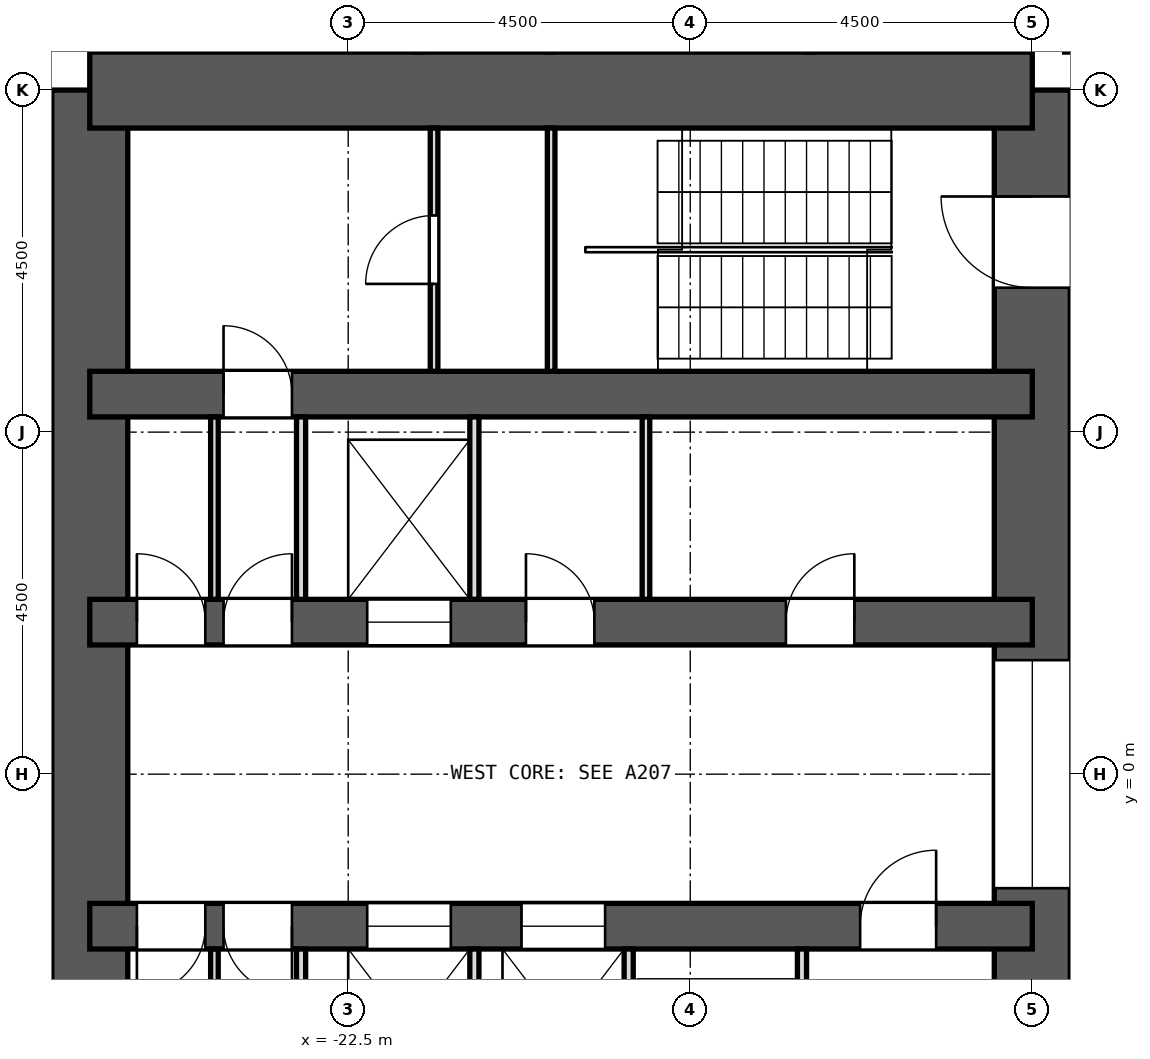
"""IFC4 building model, lengths in metres.
Left out: names, types, materials, properties, quantities, classifications, styles, units other than length and angle.
Written with IfcOpenShell. Run it as: python <this file> out.ifc"""

import sys

from ifc_helpers import new_model, si_unit, direction, frame, frame_2d, origin, place, context, subcontext, project, spatial, rectangle, extrude, element, fill, save


model = new_model("IFC4")
c1 = context("Model", 3, precision=1e-05, world=origin(), true_north=direction((0.0, 1.0)))
c2 = subcontext(c1, "Body", "Model", "MODEL_VIEW")
j1 = project(units=[si_unit("LENGTHUNIT", "METRE"), si_unit("PLANEANGLEUNIT", "RADIAN")], contexts=[c1])
p1 = place(None, origin())
s1 = spatial("IfcSite", under=j1, at=p1, CompositionType="ELEMENT")
p2 = place(p1, origin())
s2 = spatial("IfcBuilding", under=s1, at=p2, CompositionType="ELEMENT")
p3 = place(p2, frame((0.0, 0.0, 17.6)))
s3 = spatial("IfcBuildingStorey", under=s2, at=p3, CompositionType="ELEMENT", Elevation=17.6)
p4 = place(p3, frame((-13.5, -9.0, 0.0), z_axis=(0.0, 0.0, 1.0), x_axis=(0.0, 1.0, 0.0)))
e1 = element("IfcWall", 1, at=p4, inside=s3, PredefinedType="SHEAR", context=c2, shape_type="SweptSolid", body=[
    extrude(rectangle(XDim=18.0, YDim=1.0, at=frame_2d((9.0, 0.0))), origin(), (0.0, 0.0, 1.0), 4.2),
])
p5 = place(p4, frame((15.4, 0.0, 0.0)))
e2 = element("IfcOpeningElement", 2, at=p5, cuts=e1, PredefinedType="OPENING", context=c2, shape_type="SweptSolid", body=[
    extrude(rectangle(XDim=1.2, YDim=2.1, at=frame_2d((0.6, 1.05))), frame((0.0, 0.512, 0.0), z_axis=(0.0, -1.0, 0.0), x_axis=(1.0, 0.0, 0.0)), (0.0, 0.0, 1.0), 1.024),
])
p6 = place(p4, frame((1.4, 0.0, 0.0)))
e3 = element("IfcOpeningElement", 3, at=p6, cuts=e1, PredefinedType="OPENING", context=c2, shape_type="SweptSolid", body=[
    extrude(rectangle(XDim=1.2, YDim=2.1, at=frame_2d((0.6, 1.05))), frame((0.0, 0.512, 0.0), z_axis=(0.0, -1.0, 0.0), x_axis=(1.0, 0.0, 0.0)), (0.0, 0.0, 1.0), 1.024),
])
p7 = place(p4, frame((7.5, 0.0, 0.0)))
e4 = element("IfcOpeningElement", 4, at=p7, cuts=e1, PredefinedType="OPENING", context=c2, shape_type="SweptSolid", body=[
    extrude(rectangle(XDim=3.0, YDim=2.4, at=frame_2d((1.5, 1.2))), frame((0.0, 0.512, 0.0), z_axis=(0.0, -1.0, 0.0), x_axis=(1.0, 0.0, 0.0)), (0.0, 0.0, 1.0), 1.024),
])
p8 = place(p3, frame((-25.9, -9.0, 0.0), z_axis=(0.0, 0.0, 1.0), x_axis=(0.0, 1.0, 0.0)))
e5 = element("IfcWall", 5, at=p8, inside=s3, PredefinedType="SHEAR", context=c2, shape_type="SweptSolid", body=[
    extrude(rectangle(XDim=18.0, YDim=1.0, at=frame_2d((9.0, 0.0))), origin(), (0.0, 0.0, 1.0), 4.2),
])
p9 = place(p3, frame((-13.5, 9.0, 0.0), z_axis=(0.0, 0.0, 1.0), x_axis=(-1.0, 0.0, 0.0)))
e6 = element("IfcWall", 6, at=p9, inside=s3, PredefinedType="SHEAR", context=c2, shape_type="SweptSolid", body=[
    extrude(rectangle(XDim=12.4, YDim=1.0, at=frame_2d((6.2, 0.0))), origin(), (0.0, 0.0, 1.0), 4.2),
])
p10 = place(p3, frame((-13.5, 5.0, 0.0), z_axis=(0.0, 0.0, 1.0), x_axis=(-1.0, 0.0, 0.0)))
e7 = element("IfcWall", 7, at=p10, inside=s3, PredefinedType="SHEAR", context=c2, shape_type="SweptSolid", body=[
    extrude(rectangle(XDim=12.4, YDim=0.6, at=frame_2d((6.2, 0.0))), origin(), (0.0, 0.0, 1.0), 4.2),
])
p11 = place(p10, frame((9.74, 0.0, 0.0)))
e8 = element("IfcOpeningElement", 8, at=p11, cuts=e7, PredefinedType="OPENING", context=c2, shape_type="SweptSolid", body=[
    extrude(rectangle(XDim=0.9, YDim=2.1, at=frame_2d((0.45, 1.05))), frame((0.0, 0.312, 0.0), z_axis=(0.0, -1.0, 0.0), x_axis=(1.0, 0.0, 0.0)), (0.0, 0.0, 1.0), 0.624),
])
p12 = place(p3, frame((-13.5, 2.0, 0.0), z_axis=(0.0, 0.0, 1.0), x_axis=(-1.0, 0.0, 0.0)))
e9 = element("IfcWall", 9, at=p12, inside=s3, PredefinedType="SHEAR", context=c2, shape_type="SweptSolid", body=[
    extrude(rectangle(XDim=12.4, YDim=0.6, at=frame_2d((6.2, 0.0))), origin(), (0.0, 0.0, 1.0), 4.2),
])
p13 = place(p12, frame((7.65, 0.0, 0.0)))
e10 = element("IfcOpeningElement", 10, at=p13, cuts=e9, PredefinedType="OPENING", context=c2, shape_type="SweptSolid", body=[
    extrude(rectangle(XDim=1.1, YDim=2.1, at=frame_2d((0.55, 1.05))), frame((0.0, 0.312, 0.0), z_axis=(0.0, -1.0, 0.0), x_axis=(1.0, 0.0, 0.0)), (0.0, 0.0, 1.0), 0.624),
])
p14 = place(p12, frame((2.341, 0.0, 0.0)))
e11 = element("IfcOpeningElement", 11, at=p14, cuts=e9, PredefinedType="OPENING", context=c2, shape_type="SweptSolid", body=[
    extrude(rectangle(XDim=0.9, YDim=2.1, at=frame_2d((0.45, 1.05))), frame((0.0, 0.312, 0.0), z_axis=(0.0, -1.0, 0.0), x_axis=(1.0, 0.0, 0.0)), (0.0, 0.0, 1.0), 0.624),
])
p15 = place(p12, frame((5.761, 0.0, 0.0)))
e12 = element("IfcOpeningElement", 12, at=p15, cuts=e9, PredefinedType="OPENING", context=c2, shape_type="SweptSolid", body=[
    extrude(rectangle(XDim=0.9, YDim=2.1, at=frame_2d((0.45, 1.05))), frame((0.0, 0.312, 0.0), z_axis=(0.0, -1.0, 0.0), x_axis=(1.0, 0.0, 0.0)), (0.0, 0.0, 1.0), 0.624),
])
p16 = place(p12, frame((9.74, 0.0, 0.0)))
e13 = element("IfcOpeningElement", 13, at=p16, cuts=e9, PredefinedType="OPENING", context=c2, shape_type="SweptSolid", body=[
    extrude(rectangle(XDim=0.9, YDim=2.1, at=frame_2d((0.45, 1.05))), frame((0.0, 0.312, 0.0), z_axis=(0.0, -1.0, 0.0), x_axis=(1.0, 0.0, 0.0)), (0.0, 0.0, 1.0), 0.624),
])
p17 = place(p12, frame((10.88, 0.0, 0.0)))
e14 = element("IfcOpeningElement", 14, at=p17, cuts=e9, PredefinedType="OPENING", context=c2, shape_type="SweptSolid", body=[
    extrude(rectangle(XDim=0.9, YDim=2.1, at=frame_2d((0.45, 1.05))), frame((0.0, 0.312, 0.0), z_axis=(0.0, -1.0, 0.0), x_axis=(1.0, 0.0, 0.0)), (0.0, 0.0, 1.0), 0.624),
])
p18 = place(p3, frame((-13.5, -2.0, 0.0), z_axis=(0.0, 0.0, 1.0), x_axis=(-1.0, 0.0, 0.0)))
e15 = element("IfcWall", 15, at=p18, inside=s3, PredefinedType="SHEAR", context=c2, shape_type="SweptSolid", body=[
    extrude(rectangle(XDim=12.4, YDim=0.6, at=frame_2d((6.2, 0.0))), origin(), (0.0, 0.0, 1.0), 4.2),
])
p19 = place(p18, frame((5.62, 0.0, 0.0)))
e16 = element("IfcOpeningElement", 16, at=p19, cuts=e15, PredefinedType="OPENING", context=c2, shape_type="SweptSolid", body=[
    extrude(rectangle(XDim=1.1, YDim=2.1, at=frame_2d((0.55, 1.05))), frame((0.0, 0.312, 0.0), z_axis=(0.0, -1.0, 0.0), x_axis=(1.0, 0.0, 0.0)), (0.0, 0.0, 1.0), 0.624),
])
p20 = place(p18, frame((7.65, 0.0, 0.0)))
e17 = element("IfcOpeningElement", 17, at=p20, cuts=e15, PredefinedType="OPENING", context=c2, shape_type="SweptSolid", body=[
    extrude(rectangle(XDim=1.1, YDim=2.1, at=frame_2d((0.55, 1.05))), frame((0.0, 0.312, 0.0), z_axis=(0.0, -1.0, 0.0), x_axis=(1.0, 0.0, 0.0)), (0.0, 0.0, 1.0), 0.624),
])
p21 = place(p18, frame((1.265, 0.0, 0.0)))
e18 = element("IfcOpeningElement", 18, at=p21, cuts=e15, PredefinedType="OPENING", context=c2, shape_type="SweptSolid", body=[
    extrude(rectangle(XDim=1.0, YDim=2.1, at=frame_2d((0.5, 1.05))), frame((0.0, 0.312, 0.0), z_axis=(0.0, -1.0, 0.0), x_axis=(1.0, 0.0, 0.0)), (0.0, 0.0, 1.0), 0.624),
])
p22 = place(p18, frame((9.74, 0.0, 0.0)))
e19 = element("IfcOpeningElement", 19, at=p22, cuts=e15, PredefinedType="OPENING", context=c2, shape_type="SweptSolid", body=[
    extrude(rectangle(XDim=0.9, YDim=2.1, at=frame_2d((0.45, 1.05))), frame((0.0, 0.312, 0.0), z_axis=(0.0, -1.0, 0.0), x_axis=(1.0, 0.0, 0.0)), (0.0, 0.0, 1.0), 0.624),
])
p23 = place(p18, frame((10.88, 0.0, 0.0)))
e20 = element("IfcOpeningElement", 20, at=p23, cuts=e15, PredefinedType="OPENING", context=c2, shape_type="SweptSolid", body=[
    extrude(rectangle(XDim=0.9, YDim=2.1, at=frame_2d((0.45, 1.05))), frame((0.0, 0.312, 0.0), z_axis=(0.0, -1.0, 0.0), x_axis=(1.0, 0.0, 0.0)), (0.0, 0.0, 1.0), 0.624),
])
p24 = place(p3, frame((-26.328, 11.255, 0.0), z_axis=(0.0, 0.0, 1.0), x_axis=(-0.342034744565, -0.939687306241, 0.0)))
e21 = element("IfcWall", 21, at=p24, inside=s3, PredefinedType="SOLIDWALL", context=c2, shape_type="SweptSolid", body=[
    extrude(rectangle(XDim=4.099, YDim=0.6, at=frame_2d((2.05, 0.0))), origin(), (0.0, 0.0, 1.0), 3.6),
])
p25 = place(p3, frame((-18.583, 2.3, 0.0), z_axis=(0.0, 0.0, 1.0), x_axis=(0.0, 1.0, 0.0)))
e22 = element("IfcWall", 22, at=p25, inside=s3, PredefinedType="PARTITIONING", context=c2, shape_type="SweptSolid", body=[
    extrude(rectangle(XDim=2.4, YDim=0.1, at=frame_2d((1.2, 0.0))), origin(), (0.0, 0.0, 1.0), 3.6),
])
for number, where, z_axis, x_axis in (
    (23, (-20.84, 2.3, 0.0), (0.0, 0.0, 1.0), (0.0, 1.0, 0.0)),
    (24, (-23.12, 2.3, 0.0), (0.0, 0.0, 1.0), (0.0, 1.0, 0.0)),
):
    element("IfcWall", number, at=place(p3, frame(where, z_axis=z_axis, x_axis=x_axis)), inside=s3, PredefinedType="PARTITIONING", context=c2, shape_type="SweptSolid", body=[
        extrude(rectangle(XDim=2.4, YDim=0.12, at=frame_2d((1.2, 0.0))), origin(), (0.0, 0.0, 1.0), 3.6),
    ])
p26 = place(p3, frame((-24.26, 2.3, 0.0), z_axis=(0.0, 0.0, 1.0), x_axis=(0.0, 1.0, 0.0)))
e25 = element("IfcWall", 25, at=p26, inside=s3, PredefinedType="PARTITIONING", context=c2, shape_type="SweptSolid", body=[
    extrude(rectangle(XDim=2.4, YDim=0.1, at=frame_2d((1.2, 0.0))), origin(), (0.0, 0.0, 1.0), 3.6),
])
p27 = place(p3, frame((-16.53, -4.7, 0.0), z_axis=(0.0, 0.0, 1.0), x_axis=(0.0, 1.0, 0.0)))
e26 = element("IfcWall", 26, at=p27, inside=s3, PredefinedType="PARTITIONING", context=c2, shape_type="SweptSolid", body=[
    extrude(rectangle(XDim=2.4, YDim=0.12, at=frame_2d((1.2, 0.0))), origin(), (0.0, 0.0, 1.0), 3.6),
])
p28 = place(p27, frame((0.65, 0.0, 0.0)))
e27 = element("IfcOpeningElement", 27, at=p28, cuts=e26, PredefinedType="OPENING", context=c2, shape_type="SweptSolid", body=[
    extrude(rectangle(XDim=1.1, YDim=2.1, at=frame_2d((0.55, 1.05))), frame((0.0, 0.072, 0.0), z_axis=(0.0, -1.0, 0.0), x_axis=(1.0, 0.0, 0.0)), (0.0, 0.0, 1.0), 0.144),
])
for number, where, z_axis, x_axis in (
    (28, (-18.81, -4.7, 0.0), (0.0, 0.0, 1.0), (0.0, 1.0, 0.0)),
    (29, (-20.84, -4.7, 0.0), (0.0, 0.0, 1.0), (0.0, 1.0, 0.0)),
    (30, (-23.12, -4.7, 0.0), (0.0, 0.0, 1.0), (0.0, 1.0, 0.0)),
):
    element("IfcWall", number, at=place(p3, frame(where, z_axis=z_axis, x_axis=x_axis)), inside=s3, PredefinedType="PARTITIONING", context=c2, shape_type="SweptSolid", body=[
        extrude(rectangle(XDim=2.4, YDim=0.12, at=frame_2d((1.2, 0.0))), origin(), (0.0, 0.0, 1.0), 3.6),
    ])
p29 = place(p3, frame((-24.26, -4.7, 0.0), z_axis=(0.0, 0.0, 1.0), x_axis=(0.0, 1.0, 0.0)))
e31 = element("IfcWall", 31, at=p29, inside=s3, PredefinedType="PARTITIONING", context=c2, shape_type="SweptSolid", body=[
    extrude(rectangle(XDim=2.4, YDim=0.1, at=frame_2d((1.2, 0.0))), origin(), (0.0, 0.0, 1.0), 3.6),
])
p30 = place(p3, frame((-19.83, 5.3, 0.0), z_axis=(0.0, 0.0, 1.0), x_axis=(0.0, 1.0, 0.0)))
e32 = element("IfcWall", 32, at=p30, inside=s3, PredefinedType="PARTITIONING", context=c2, shape_type="SweptSolid", body=[
    extrude(rectangle(XDim=3.2, YDim=0.1, at=frame_2d((1.6, 0.0))), origin(), (0.0, 0.0, 1.0), 3.6),
])
p31 = place(p3, frame((-21.37, 5.3, 0.0), z_axis=(0.0, 0.0, 1.0), x_axis=(0.0, 1.0, 0.0)))
e33 = element("IfcWall", 33, at=p31, inside=s3, PredefinedType="PARTITIONING", context=c2, shape_type="SweptSolid", body=[
    extrude(rectangle(XDim=3.2, YDim=0.1, at=frame_2d((1.6, 0.0))), origin(), (0.0, 0.0, 1.0), 3.6),
])
p32 = place(p31, frame((1.15, 0.0, 0.0)))
e34 = element("IfcOpeningElement", 34, at=p32, cuts=e33, PredefinedType="OPENING", context=c2, shape_type="SweptSolid", body=[
    extrude(rectangle(XDim=0.9, YDim=2.1, at=frame_2d((0.45, 1.05))), frame((0.0, 0.062, 0.0), z_axis=(0.0, -1.0, 0.0), x_axis=(1.0, 0.0, 0.0)), (0.0, 0.0, 1.0), 0.124),
])
p33 = place(p13, origin())
e35 = element("IfcDoor", 35, at=p33, inside=s3, OperationType="DOUBLE_DOOR_SLIDING", PredefinedType="DOOR", context=c2, shape_type="SweptSolid", body=[
    extrude(rectangle(XDim=1.1, YDim=2.1, at=frame_2d((0.55, 1.05))), frame((0.0, 0.025, 0.0), z_axis=(0.0, -1.0, 0.0), x_axis=(1.0, 0.0, 0.0)), (0.0, 0.0, 1.0), 0.05),
])
fill(e10, e35)
p34 = place(p19, origin())
e36 = element("IfcDoor", 36, at=p34, inside=s3, OperationType="DOUBLE_DOOR_SLIDING", PredefinedType="DOOR", context=c2, shape_type="SweptSolid", body=[
    extrude(rectangle(XDim=1.1, YDim=2.1, at=frame_2d((0.55, 1.05))), frame((0.0, 0.025, 0.0), z_axis=(0.0, -1.0, 0.0), x_axis=(1.0, 0.0, 0.0)), (0.0, 0.0, 1.0), 0.05),
])
fill(e16, e36)
p35 = place(p20, origin())
e37 = element("IfcDoor", 37, at=p35, inside=s3, OperationType="DOUBLE_DOOR_SLIDING", PredefinedType="DOOR", context=c2, shape_type="SweptSolid", body=[
    extrude(rectangle(XDim=1.1, YDim=2.1, at=frame_2d((0.55, 1.05))), frame((0.0, 0.025, 0.0), z_axis=(0.0, -1.0, 0.0), x_axis=(1.0, 0.0, 0.0)), (0.0, 0.0, 1.0), 0.05),
])
fill(e17, e37)
p36 = place(p14, frame((0.9, 0.0, 0.0), z_axis=(0.0, 0.0, 1.0), x_axis=(-1.0, 0.0, 0.0)))
e38 = element("IfcDoor", 38, at=p36, inside=s3, OperationType="SINGLE_SWING_RIGHT", PredefinedType="DOOR", context=c2, shape_type="SweptSolid", body=[
    extrude(rectangle(XDim=0.9, YDim=2.1, at=frame_2d((0.45, 1.05))), frame((0.0, 0.025, 0.0), z_axis=(0.0, -1.0, 0.0), x_axis=(1.0, 0.0, 0.0)), (0.0, 0.0, 1.0), 0.05),
])
fill(e11, e38)
p37 = place(p15, frame((0.9, 0.0, 0.0), z_axis=(0.0, 0.0, 1.0), x_axis=(-1.0, 0.0, 0.0)))
e39 = element("IfcDoor", 39, at=p37, inside=s3, OperationType="SINGLE_SWING_LEFT", PredefinedType="DOOR", context=c2, shape_type="SweptSolid", body=[
    extrude(rectangle(XDim=0.9, YDim=2.1, at=frame_2d((0.45, 1.05))), frame((0.0, 0.025, 0.0), z_axis=(0.0, -1.0, 0.0), x_axis=(1.0, 0.0, 0.0)), (0.0, 0.0, 1.0), 0.05),
])
fill(e12, e39)
p38 = place(p16, frame((0.9, 0.0, 0.0), z_axis=(0.0, 0.0, 1.0), x_axis=(-1.0, 0.0, 0.0)))
e40 = element("IfcDoor", 40, at=p38, inside=s3, OperationType="SINGLE_SWING_RIGHT", PredefinedType="DOOR", context=c2, shape_type="SweptSolid", body=[
    extrude(rectangle(XDim=0.9, YDim=2.1, at=frame_2d((0.45, 1.05))), frame((0.0, 0.025, 0.0), z_axis=(0.0, -1.0, 0.0), x_axis=(1.0, 0.0, 0.0)), (0.0, 0.0, 1.0), 0.05),
])
fill(e13, e40)
p39 = place(p17, frame((0.9, 0.0, 0.0), z_axis=(0.0, 0.0, 1.0), x_axis=(-1.0, 0.0, 0.0)))
e41 = element("IfcDoor", 41, at=p39, inside=s3, OperationType="SINGLE_SWING_LEFT", PredefinedType="DOOR", context=c2, shape_type="SweptSolid", body=[
    extrude(rectangle(XDim=0.9, YDim=2.1, at=frame_2d((0.45, 1.05))), frame((0.0, 0.025, 0.0), z_axis=(0.0, -1.0, 0.0), x_axis=(1.0, 0.0, 0.0)), (0.0, 0.0, 1.0), 0.05),
])
fill(e14, e41)
p40 = place(p21, frame((1.0, 0.0, 0.0), z_axis=(0.0, 0.0, 1.0), x_axis=(-1.0, 0.0, 0.0)))
e42 = element("IfcDoor", 42, at=p40, inside=s3, OperationType="SINGLE_SWING_RIGHT", PredefinedType="DOOR", context=c2, shape_type="SweptSolid", body=[
    extrude(rectangle(XDim=1.0, YDim=2.1, at=frame_2d((0.5, 1.05))), frame((0.0, 0.025, 0.0), z_axis=(0.0, -1.0, 0.0), x_axis=(1.0, 0.0, 0.0)), (0.0, 0.0, 1.0), 0.05),
])
fill(e18, e42)
p41 = place(p22, origin())
e43 = element("IfcDoor", 43, at=p41, inside=s3, OperationType="SINGLE_SWING_LEFT", PredefinedType="DOOR", context=c2, shape_type="SweptSolid", body=[
    extrude(rectangle(XDim=0.9, YDim=2.1, at=frame_2d((0.45, 1.05))), frame((0.0, 0.025, 0.0), z_axis=(0.0, -1.0, 0.0), x_axis=(1.0, 0.0, 0.0)), (0.0, 0.0, 1.0), 0.05),
])
fill(e19, e43)
p42 = place(p23, origin())
e44 = element("IfcDoor", 44, at=p42, inside=s3, OperationType="SINGLE_SWING_RIGHT", PredefinedType="DOOR", context=c2, shape_type="SweptSolid", body=[
    extrude(rectangle(XDim=0.9, YDim=2.1, at=frame_2d((0.45, 1.05))), frame((0.0, 0.025, 0.0), z_axis=(0.0, -1.0, 0.0), x_axis=(1.0, 0.0, 0.0)), (0.0, 0.0, 1.0), 0.05),
])
fill(e20, e44)
p43 = place(p32, origin())
e45 = element("IfcDoor", 45, at=p43, inside=s3, OperationType="SINGLE_SWING_LEFT", PredefinedType="DOOR", context=c2, shape_type="SweptSolid", body=[
    extrude(rectangle(XDim=0.9, YDim=2.1, at=frame_2d((0.45, 1.05))), frame((0.0, 0.025, 0.0), z_axis=(0.0, -1.0, 0.0), x_axis=(1.0, 0.0, 0.0)), (0.0, 0.0, 1.0), 0.05),
])
fill(e34, e45)
p44 = place(p11, frame((0.9, 0.0, 0.0), z_axis=(0.0, 0.0, 1.0), x_axis=(-1.0, 0.0, 0.0)))
e46 = element("IfcDoor", 46, at=p44, inside=s3, OperationType="SINGLE_SWING_LEFT", PredefinedType="DOOR", context=c2, shape_type="SweptSolid", body=[
    extrude(rectangle(XDim=0.9, YDim=2.1, at=frame_2d((0.45, 1.05))), frame((0.0, 0.025, 0.0), z_axis=(0.0, -1.0, 0.0), x_axis=(1.0, 0.0, 0.0)), (0.0, 0.0, 1.0), 0.05),
])
fill(e8, e46)
p45 = place(p5, origin())
e47 = element("IfcDoor", 47, at=p45, inside=s3, OperationType="SINGLE_SWING_RIGHT", PredefinedType="DOOR", context=c2, shape_type="SweptSolid", body=[
    extrude(rectangle(XDim=1.2, YDim=2.1, at=frame_2d((0.6, 1.05))), frame((0.0, 0.025, 0.0), z_axis=(0.0, -1.0, 0.0), x_axis=(1.0, 0.0, 0.0)), (0.0, 0.0, 1.0), 0.05),
])
fill(e2, e47)
p46 = place(p7, origin())
e48 = element("IfcDoor", 48, at=p46, inside=s3, OperationType="DOUBLE_DOOR_SLIDING", PredefinedType="DOOR", context=c2, shape_type="SweptSolid", body=[
    extrude(rectangle(XDim=3.0, YDim=2.4, at=frame_2d((1.5, 1.2))), frame((0.0, 0.025, 0.0), z_axis=(0.0, -1.0, 0.0), x_axis=(1.0, 0.0, 0.0)), (0.0, 0.0, 1.0), 0.05),
])
fill(e4, e48)
save(model, sys.argv[1])
